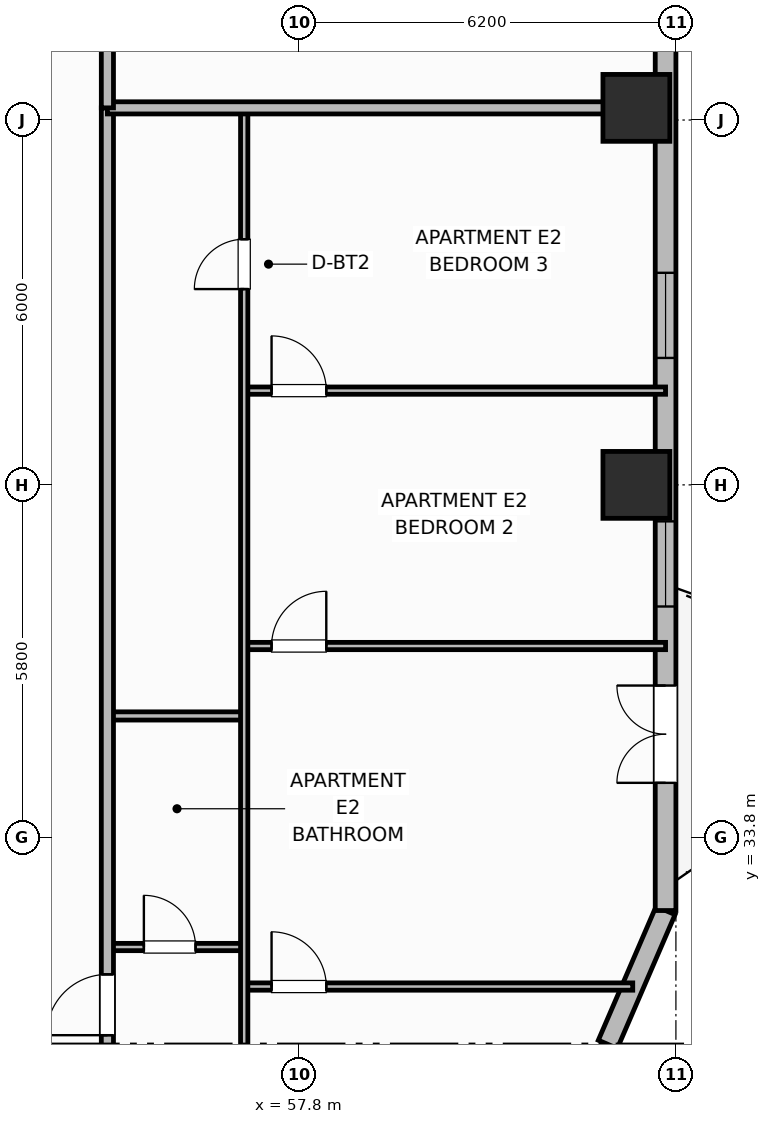
"""IFC4 building model, lengths in metres.
Left out: names, types, materials, properties, quantities, classifications, styles, units other than length and angle.
Written with IfcOpenShell. Run it as: python <this file> out.ifc"""

import sys

from ifc_helpers import new_model, si_unit, direction, frame, frame_2d, origin, origin_2d, place, context, subcontext, project, spatial, rectangle, extrude, element, fill, save


model = new_model("IFC4")
c1 = context("Model", 3, precision=1e-05, world=origin(), true_north=direction((0.0, 1.0)))
c2 = subcontext(c1, "Body", "Model", "MODEL_VIEW")
j1 = project(units=[si_unit("LENGTHUNIT", "METRE"), si_unit("PLANEANGLEUNIT", "RADIAN")], contexts=[c1])
p1 = place(None, origin())
s1 = spatial("IfcSite", under=j1, at=p1, CompositionType="ELEMENT")
p2 = place(p1, origin())
s2 = spatial("IfcBuilding", under=s1, at=p2, CompositionType="ELEMENT")
p3 = place(p2, frame((0.0, 0.0, 103.1)))
s3 = spatial("IfcBuildingStorey", under=s2, at=p3, CompositionType="ELEMENT", Elevation=103.1)
for number, where, z_axis, x_axis in (
    (1, (63.35, 39.6, 0.0), (0.0, 0.0, 1.0), (1.0, 0.0, 0.0)),
    (2, (63.35, 45.8, 0.0), (0.0, 0.0, 1.0), (1.0, 0.0, 0.0)),
):
    element("IfcColumn", number, at=place(p3, frame(where, z_axis=z_axis, x_axis=x_axis)), inside=s3, PredefinedType="COLUMN", context=c2, shape_type="SweptSolid", body=[
        extrude(rectangle(XDim=1.1, YDim=1.1, at=origin_2d()), origin(), (0.0, 0.0, 1.0), 3.7),
    ])
p4 = place(p3, frame((63.83, 29.0, 0.0), z_axis=(0.0, 0.0, 1.0), x_axis=(-0.561607274182, 0.827403933751, 0.0)))
e3 = element("IfcWall", 3, at=p4, inside=s3, PredefinedType="SOLIDWALL", context=c2, shape_type="SweptSolid", body=[
    extrude(rectangle(XDim=1.692, YDim=0.34, at=frame_2d((0.846, 0.0))), origin(), (0.0, 0.0, 1.0), 2.7),
])
p5 = place(p3, frame((62.88, 30.4, 0.0), z_axis=(0.0, 0.0, 1.0), x_axis=(0.396475042899, 0.918045500157, 0.0)))
e4 = element("IfcWall", 4, at=p5, inside=s3, PredefinedType="SOLIDWALL", context=c2, shape_type="SweptSolid", body=[
    extrude(rectangle(XDim=2.397, YDim=0.34, at=frame_2d((1.198, 0.0))), origin(), (0.0, 0.0, 1.0), 2.7),
])
p6 = place(p3, frame((63.83, 32.6, 0.0), z_axis=(0.0, 0.0, 1.0), x_axis=(0.0, 1.0, 0.0)))
e5 = element("IfcWall", 5, at=p6, inside=s3, PredefinedType="SOLIDWALL", context=c2, shape_type="SweptSolid", body=[
    extrude(rectangle(XDim=14.8, YDim=0.34, at=frame_2d((7.4, 0.0))), origin(), (0.0, 0.0, 1.0), 2.7),
])
p7 = place(p6, frame((2.1, 0.0, 0.0)))
e6 = element("IfcOpeningElement", 6, at=p7, cuts=e5, PredefinedType="OPENING", context=c2, shape_type="SweptSolid", body=[
    extrude(rectangle(XDim=1.6, YDim=2.1, at=frame_2d((0.8, 1.05))), frame((0.0, 0.18, 0.0), z_axis=(0.0, -1.0, 0.0), x_axis=(1.0, 0.0, 0.0)), (0.0, 0.0, 1.0), 0.36),
])
p8 = place(p6, frame((5.0, 0.0, 0.69)))
e7 = element("IfcOpeningElement", 7, at=p8, cuts=e5, PredefinedType="OPENING", context=c2, shape_type="SweptSolid", body=[
    extrude(rectangle(XDim=1.4, YDim=1.85, at=frame_2d((0.7, 0.925))), frame((0.0, 0.18, 0.0), z_axis=(0.0, -1.0, 0.0), x_axis=(1.0, 0.0, 0.0)), (0.0, 0.0, 1.0), 0.36),
])
p9 = place(p6, frame((9.087, 0.0, 0.73)))
e8 = element("IfcOpeningElement", 8, at=p9, cuts=e5, PredefinedType="OPENING", context=c2, shape_type="SweptSolid", body=[
    extrude(rectangle(XDim=1.4, YDim=1.85, at=frame_2d((0.7, 0.925))), frame((0.0, 0.18, 0.0), z_axis=(0.0, -1.0, 0.0), x_axis=(1.0, 0.0, 0.0)), (0.0, 0.0, 1.0), 0.36),
])
p10 = place(p3, frame((54.65, 32.0, 0.0), z_axis=(0.0, 0.0, 1.0), x_axis=(1.0, 0.0, 0.0)))
e9 = element("IfcWall", 9, at=p10, inside=s3, PredefinedType="PARTITIONING", context=c2, shape_type="SweptSolid", body=[
    extrude(rectangle(XDim=2.25, YDim=0.12, at=frame_2d((1.125, 0.0))), origin(), (0.0, 0.0, 1.0), 2.53),
])
p11 = place(p10, frame((0.6, 0.0, 0.0)))
e10 = element("IfcOpeningElement", 10, at=p11, cuts=e9, PredefinedType="OPENING", context=c2, shape_type="SweptSolid", body=[
    extrude(rectangle(XDim=0.85, YDim=2.1, at=frame_2d((0.425, 1.05))), frame((0.0, 0.07, 0.0), z_axis=(0.0, -1.0, 0.0), x_axis=(1.0, 0.0, 0.0)), (0.0, 0.0, 1.0), 0.14),
])
p12 = place(p3, frame((54.65, 35.8, 0.0), z_axis=(0.0, 0.0, 1.0), x_axis=(1.0, 0.0, 0.0)))
e11 = element("IfcWall", 11, at=p12, inside=s3, PredefinedType="PARTITIONING", context=c2, shape_type="SweptSolid", body=[
    extrude(rectangle(XDim=2.25, YDim=0.135, at=frame_2d((1.125, 0.0))), origin(), (0.0, 0.0, 1.0), 2.53),
])
p13 = place(p3, frame((56.9, 31.35, 0.0), z_axis=(0.0, 0.0, 1.0), x_axis=(1.0, 0.0, 0.0)))
e12 = element("IfcWall", 12, at=p13, inside=s3, PredefinedType="PARTITIONING", context=c2, shape_type="SweptSolid", body=[
    extrude(rectangle(XDim=6.39, YDim=0.12, at=frame_2d((3.195, 0.0))), origin(), (0.0, 0.0, 1.0), 2.53),
])
p14 = place(p13, frame((0.45, 0.0, 0.0)))
e13 = element("IfcOpeningElement", 13, at=p14, cuts=e12, PredefinedType="OPENING", context=c2, shape_type="SweptSolid", body=[
    extrude(rectangle(XDim=0.9, YDim=2.1, at=frame_2d((0.45, 1.05))), frame((0.0, 0.07, 0.0), z_axis=(0.0, -1.0, 0.0), x_axis=(1.0, 0.0, 0.0)), (0.0, 0.0, 1.0), 0.14),
])
p15 = place(p3, frame((56.9, 36.95, 0.0), z_axis=(0.0, 0.0, 1.0), x_axis=(1.0, 0.0, 0.0)))
e14 = element("IfcWall", 14, at=p15, inside=s3, PredefinedType="PARTITIONING", context=c2, shape_type="SweptSolid", body=[
    extrude(rectangle(XDim=6.93, YDim=0.12, at=frame_2d((3.465, 0.0))), origin(), (0.0, 0.0, 1.0), 2.53),
])
p16 = place(p15, frame((0.45, 0.0, 0.0)))
e15 = element("IfcOpeningElement", 15, at=p16, cuts=e14, PredefinedType="OPENING", context=c2, shape_type="SweptSolid", body=[
    extrude(rectangle(XDim=0.9, YDim=2.1, at=frame_2d((0.45, 1.05))), frame((0.0, 0.07, 0.0), z_axis=(0.0, -1.0, 0.0), x_axis=(1.0, 0.0, 0.0)), (0.0, 0.0, 1.0), 0.14),
])
p17 = place(p3, frame((56.9, 41.15, 0.0), z_axis=(0.0, 0.0, 1.0), x_axis=(1.0, 0.0, 0.0)))
e16 = element("IfcWall", 16, at=p17, inside=s3, PredefinedType="PARTITIONING", context=c2, shape_type="SweptSolid", body=[
    extrude(rectangle(XDim=6.93, YDim=0.12, at=frame_2d((3.465, 0.0))), origin(), (0.0, 0.0, 1.0), 2.53),
])
p18 = place(p17, frame((0.45, 0.0, 0.0)))
e17 = element("IfcOpeningElement", 17, at=p18, cuts=e16, PredefinedType="OPENING", context=c2, shape_type="SweptSolid", body=[
    extrude(rectangle(XDim=0.9, YDim=2.1, at=frame_2d((0.45, 1.05))), frame((0.0, 0.07, 0.0), z_axis=(0.0, -1.0, 0.0), x_axis=(1.0, 0.0, 0.0)), (0.0, 0.0, 1.0), 0.14),
])
p19 = place(p3, frame((56.9, 26.64, 0.0), z_axis=(0.0, 0.0, 1.0), x_axis=(0.0, 1.0, 0.0)))
e18 = element("IfcWall", 18, at=p19, inside=s3, PredefinedType="PARTITIONING", context=c2, shape_type="SweptSolid", body=[
    extrude(rectangle(XDim=19.12, YDim=0.12, at=frame_2d((9.56, 0.0))), origin(), (0.0, 0.0, 1.0), 2.53),
])
p20 = place(p19, frame((2.81, 0.0, 0.0)))
e19 = element("IfcOpeningElement", 19, at=p20, cuts=e18, PredefinedType="OPENING", context=c2, shape_type="SweptSolid", body=[
    extrude(rectangle(XDim=0.9, YDim=2.1, at=frame_2d((0.45, 1.05))), frame((0.0, 0.07, 0.0), z_axis=(0.0, -1.0, 0.0), x_axis=(1.0, 0.0, 0.0)), (0.0, 0.0, 1.0), 0.14),
])
p21 = place(p19, frame((16.18, 0.0, 0.0)))
e20 = element("IfcOpeningElement", 20, at=p21, cuts=e18, PredefinedType="OPENING", context=c2, shape_type="SweptSolid", body=[
    extrude(rectangle(XDim=0.82, YDim=2.08, at=frame_2d((0.41, 1.04))), frame((0.0, 0.07, 0.0), z_axis=(0.0, -1.0, 0.0), x_axis=(1.0, 0.0, 0.0)), (0.0, 0.0, 1.0), 0.14),
])
p22 = place(p3, frame((54.65, 10.6, 0.0), z_axis=(0.0, 0.0, 1.0), x_axis=(0.0, 1.0, 0.0)))
e21 = element("IfcWall", 21, at=p22, inside=s3, PredefinedType="PARTITIONING", context=c2, shape_type="SweptSolid", body=[
    extrude(rectangle(XDim=35.2, YDim=0.2, at=frame_2d((17.6, 0.0))), origin(), (0.0, 0.0, 1.0), 2.53),
])
p23 = place(p22, frame((2.65, 0.0, 0.0)))
e22 = element("IfcOpeningElement", 22, at=p23, cuts=e21, PredefinedType="OPENING", context=c2, shape_type="SweptSolid", body=[
    extrude(rectangle(XDim=1.0, YDim=2.15, at=frame_2d((0.5, 1.075))), frame((0.0, 0.11, 0.0), z_axis=(0.0, -1.0, 0.0), x_axis=(1.0, 0.0, 0.0)), (0.0, 0.0, 1.0), 0.22),
])
p24 = place(p22, frame((19.95, 0.0, 0.0)))
e23 = element("IfcOpeningElement", 23, at=p24, cuts=e21, PredefinedType="OPENING", context=c2, shape_type="SweptSolid", body=[
    extrude(rectangle(XDim=1.0, YDim=2.15, at=frame_2d((0.5, 1.075))), frame((0.0, 0.11, 0.0), z_axis=(0.0, -1.0, 0.0), x_axis=(1.0, 0.0, 0.0)), (0.0, 0.0, 1.0), 0.22),
])
p25 = place(p3, frame((54.65, 45.8, 0.0), z_axis=(0.0, 0.0, 1.0), x_axis=(1.0, 0.0, 0.0)))
e24 = element("IfcWall", 24, at=p25, inside=s3, PredefinedType="PARTITIONING", context=c2, shape_type="SweptSolid", body=[
    extrude(rectangle(XDim=8.76, YDim=0.2, at=frame_2d((4.38, 0.0))), origin(), (0.0, 0.0, 1.0), 2.53),
])
p26 = place(p3, frame((54.65, 45.8, 0.0), z_axis=(0.0, 0.0, 1.0), x_axis=(0.0, 1.0, 0.0)))
e25 = element("IfcWall", 25, at=p26, inside=s3, PredefinedType="PARTITIONING", context=c2, shape_type="SweptSolid", body=[
    extrude(rectangle(XDim=5.63, YDim=0.2, at=frame_2d((2.815, 0.0))), origin(), (0.0, 0.0, 1.0), 2.53),
])
p27 = place(p7, origin())
e26 = element("IfcDoor", 26, at=p27, inside=s3, OperationType="DOUBLE_DOOR_SINGLE_SWING", PredefinedType="DOOR", context=c2, shape_type="SweptSolid", body=[
    extrude(rectangle(XDim=1.6, YDim=2.1, at=frame_2d((0.8, 1.05))), frame((0.0, 0.025, 0.0), z_axis=(0.0, -1.0, 0.0), x_axis=(1.0, 0.0, 0.0)), (0.0, 0.0, 1.0), 0.05),
])
fill(e6, e26)
p28 = place(p8, origin())
e27 = element("IfcWindow", 27, at=p28, inside=s3, PartitioningType="SINGLE_PANEL", PredefinedType="WINDOW", context=c2, shape_type="SweptSolid", body=[
    extrude(rectangle(XDim=1.4, YDim=1.85, at=frame_2d((0.7, 0.925))), frame((0.0, 0.03, 0.0), z_axis=(0.0, -1.0, 0.0), x_axis=(1.0, 0.0, 0.0)), (0.0, 0.0, 1.0), 0.06),
])
fill(e7, e27)
p29 = place(p9, origin())
e28 = element("IfcWindow", 28, at=p29, inside=s3, PartitioningType="SINGLE_PANEL", PredefinedType="WINDOW", context=c2, shape_type="SweptSolid", body=[
    extrude(rectangle(XDim=1.4, YDim=1.85, at=frame_2d((0.7, 0.925))), frame((0.0, 0.03, 0.0), z_axis=(0.0, -1.0, 0.0), x_axis=(1.0, 0.0, 0.0)), (0.0, 0.0, 1.0), 0.06),
])
fill(e8, e28)
p30 = place(p11, origin())
e29 = element("IfcDoor", 29, at=p30, inside=s3, OperationType="SINGLE_SWING_LEFT", PredefinedType="DOOR", context=c2, shape_type="SweptSolid", body=[
    extrude(rectangle(XDim=0.85, YDim=2.1, at=frame_2d((0.425, 1.05))), frame((0.0, 0.025, 0.0), z_axis=(0.0, -1.0, 0.0), x_axis=(1.0, 0.0, 0.0)), (0.0, 0.0, 1.0), 0.05),
])
fill(e10, e29)
p31 = place(p14, origin())
e30 = element("IfcDoor", 30, at=p31, inside=s3, OperationType="SINGLE_SWING_LEFT", PredefinedType="DOOR", context=c2, shape_type="SweptSolid", body=[
    extrude(rectangle(XDim=0.9, YDim=2.1, at=frame_2d((0.45, 1.05))), frame((0.0, 0.025, 0.0), z_axis=(0.0, -1.0, 0.0), x_axis=(1.0, 0.0, 0.0)), (0.0, 0.0, 1.0), 0.05),
])
fill(e13, e30)
p32 = place(p16, origin())
e31 = element("IfcDoor", 31, at=p32, inside=s3, OperationType="SINGLE_SWING_RIGHT", PredefinedType="DOOR", context=c2, shape_type="SweptSolid", body=[
    extrude(rectangle(XDim=0.9, YDim=2.1, at=frame_2d((0.45, 1.05))), frame((0.0, 0.025, 0.0), z_axis=(0.0, -1.0, 0.0), x_axis=(1.0, 0.0, 0.0)), (0.0, 0.0, 1.0), 0.05),
])
fill(e15, e31)
p33 = place(p18, origin())
e32 = element("IfcDoor", 32, at=p33, inside=s3, OperationType="SINGLE_SWING_LEFT", PredefinedType="DOOR", context=c2, shape_type="SweptSolid", body=[
    extrude(rectangle(XDim=0.9, YDim=2.1, at=frame_2d((0.45, 1.05))), frame((0.0, 0.025, 0.0), z_axis=(0.0, -1.0, 0.0), x_axis=(1.0, 0.0, 0.0)), (0.0, 0.0, 1.0), 0.05),
])
fill(e17, e32)
p34 = place(p21, origin())
e33 = element("IfcDoor", 33, at=p34, inside=s3, OperationType="SINGLE_SWING_LEFT", PredefinedType="DOOR", context=c2, shape_type="SweptSolid", body=[
    extrude(rectangle(XDim=0.82, YDim=2.08, at=frame_2d((0.41, 1.04))), frame((0.0, 0.025, 0.0), z_axis=(0.0, -1.0, 0.0), x_axis=(1.0, 0.0, 0.0)), (0.0, 0.0, 1.0), 0.05),
])
fill(e20, e33)
p35 = place(p24, origin())
e34 = element("IfcDoor", 34, at=p35, inside=s3, OperationType="SINGLE_SWING_LEFT", PredefinedType="DOOR", context=c2, shape_type="SweptSolid", body=[
    extrude(rectangle(XDim=1.0, YDim=2.15, at=frame_2d((0.5, 1.075))), frame((0.0, 0.025, 0.0), z_axis=(0.0, -1.0, 0.0), x_axis=(1.0, 0.0, 0.0)), (0.0, 0.0, 1.0), 0.05),
])
fill(e23, e34)
save(model, sys.argv[1])
